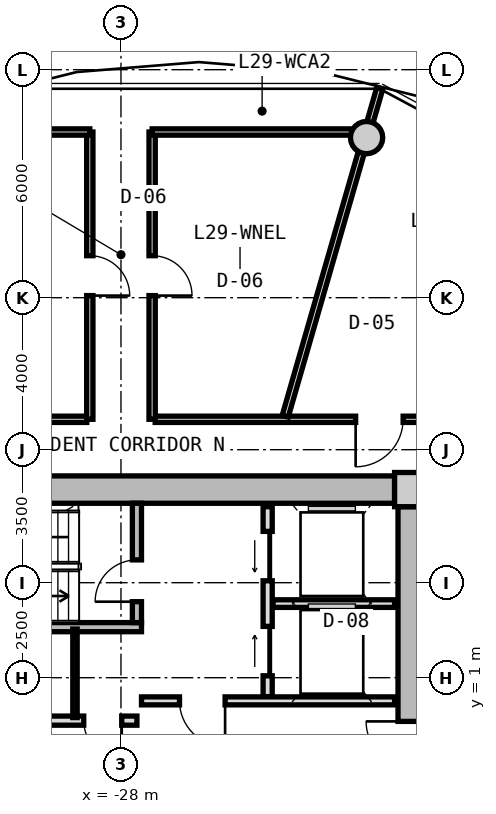
"""IFC4 building model, lengths in metres.
Left out: names, types, materials, properties, quantities, classifications, styles, units other than length and angle.
Written with IfcOpenShell. Run it as: python <this file> out.ifc"""

import sys

from ifc_helpers import new_model, si_unit, direction, frame, frame_2d, origin, origin_2d, place, context, subcontext, project, spatial, rectangle, circle, extrude, source, transform, mapped, element, fill, save


model = new_model("IFC4")
c1 = context("Model", 3, precision=1e-05, world=origin(), true_north=direction((0.0, 1.0)))
c2 = subcontext(c1, "Body", "Model", "MODEL_VIEW")
j1 = project(units=[si_unit("LENGTHUNIT", "METRE"), si_unit("PLANEANGLEUNIT", "RADIAN")], contexts=[c1])
p1 = place(None, origin())
s1 = spatial("IfcSite", under=j1, at=p1, CompositionType="ELEMENT")
p2 = place(p1, origin())
s2 = spatial("IfcBuilding", under=s1, at=p2, CompositionType="ELEMENT")
p3 = place(p2, frame((0.0, 0.0, 96.25)))
s3 = spatial("IfcBuildingStorey", under=s2, at=p3, CompositionType="ELEMENT", Elevation=96.25)
m1 = source(origin(), c2, "Body", "SweptSolid", [
    extrude(rectangle(XDim=0.9, YDim=0.9, at=origin_2d()), origin(), (0.0, 0.0, 1.0), 3.05),
])
p4 = place(p3, frame((-20.35, 5.95, 0.0), z_axis=(0.0, 0.0, 1.0), x_axis=(1.0, 0.0, 0.0)))
e1 = element("IfcColumn", 1, at=p4, inside=s3, PredefinedType="COLUMN", context=c2, shape_type="MappedRepresentation", body=[
    mapped(m1, transform((0.0, 0.0, 0.0), x_axis=(1.0, 0.0, 0.0), y_axis=(0.0, 1.0, 0.0), z_axis=(0.0, 0.0, 1.0), scale=1.0)),
])
m2 = source(origin(), c2, "Body", "SweptSolid", [
    extrude(rectangle(XDim=14.4, YDim=0.72, at=frame_2d((7.2, 0.0))), origin(), (0.0, 0.0, 1.0), 2.79),
])
p5 = place(p3, frame((-35.2, 5.95, 0.0), z_axis=(0.0, 0.0, 1.0), x_axis=(1.0, 0.0, 0.0)))
e2 = element("IfcWall", 2, at=p5, inside=s3, PredefinedType="SHEAR", context=c2, shape_type="MappedRepresentation", body=[
    mapped(m2, transform((0.0, 0.0, 0.0), x_axis=(1.0, 0.0, 0.0), y_axis=(0.0, 1.0, 0.0), z_axis=(0.0, 0.0, 1.0), scale=1.0)),
])
m3 = source(origin(), c2, "Body", "SweptSolid", [
    extrude(rectangle(XDim=11.0, YDim=0.72, at=frame_2d((5.5, 0.0))), origin(), (0.0, 0.0, 1.0), 2.79),
])
p6 = place(p3, frame((-20.35, 5.5, 0.0), z_axis=(0.0, 0.0, 1.0), x_axis=(0.0, -1.0, 0.0)))
e3 = element("IfcWall", 3, at=p6, inside=s3, PredefinedType="SHEAR", context=c2, shape_type="MappedRepresentation", body=[
    mapped(m3, transform((0.0, 0.0, 0.0), x_axis=(1.0, 0.0, 0.0), y_axis=(0.0, 1.0, 0.0), z_axis=(0.0, 0.0, 1.0), scale=1.0)),
])
p7 = place(p6, frame((5.65, 0.0, 0.0)))
e4 = element("IfcOpeningElement", 4, at=p7, cuts=e3, PredefinedType="OPENING", context=c2, shape_type="SweptSolid", body=[
    extrude(rectangle(XDim=1.2, YDim=2.15, at=frame_2d((0.6, 1.075))), frame((0.0, 0.37, 0.0), z_axis=(0.0, -1.0, 0.0), x_axis=(1.0, 0.0, 0.0)), (0.0, 0.0, 1.0), 0.74),
])
p8 = place(p6, frame((9.3, 0.0, 0.0)))
e5 = element("IfcOpeningElement", 5, at=p8, cuts=e3, PredefinedType="OPENING", context=c2, shape_type="SweptSolid", body=[
    extrude(rectangle(XDim=1.0, YDim=2.1, at=frame_2d((0.5, 1.05))), frame((0.0, 0.37, 0.0), z_axis=(0.0, -1.0, 0.0), x_axis=(1.0, 0.0, 0.0)), (0.0, 0.0, 1.0), 0.74),
])
m4 = source(origin(), c2, "Body", "SweptSolid", [
    extrude(circle(Radius=0.425, at=origin_2d()), origin(), (0.0, 0.0, 1.0), 3.05),
])
p9 = place(p3, frame((-21.537, 15.213, 0.0), z_axis=(0.0, 0.0, 1.0), x_axis=(1.0, 0.0, 0.0)))
e6 = element("IfcColumn", 6, at=p9, inside=s3, PredefinedType="COLUMN", context=c2, shape_type="MappedRepresentation", body=[
    mapped(m4, transform((0.0, 0.0, 0.0), x_axis=(1.0, 0.0, 0.0), y_axis=(0.0, 1.0, 0.0), z_axis=(0.0, 0.0, 1.0), scale=1.0)),
])
m5 = source(origin(), c2, "Body", "SweptSolid", [
    extrude(rectangle(XDim=7.83, YDim=0.24, at=frame_2d((3.915, 0.0))), origin(), (0.0, 0.0, 1.0), 2.79),
])
p10 = place(p3, frame((-35.29, 2.33, 0.0), z_axis=(0.0, 0.0, 1.0), x_axis=(1.0, 0.0, 0.0)))
e7 = element("IfcWall", 7, at=p10, inside=s3, PredefinedType="PARTITIONING", context=c2, shape_type="MappedRepresentation", body=[
    mapped(m5, transform((0.0, 0.0, 0.0), x_axis=(1.0, 0.0, 0.0), y_axis=(0.0, 1.0, 0.0), z_axis=(0.0, 0.0, 1.0), scale=1.0)),
])
m6 = source(origin(), c2, "Body", "SweptSolid", [
    extrude(rectangle(XDim=3.14, YDim=0.24, at=frame_2d((1.57, 0.0))), origin(), (0.0, 0.0, 1.0), 2.79),
])
p11 = place(p3, frame((-27.58, 2.45, 0.0), z_axis=(0.0, 0.0, 1.0), x_axis=(0.0, 1.0, 0.0)))
e8 = element("IfcWall", 8, at=p11, inside=s3, PredefinedType="PARTITIONING", context=c2, shape_type="MappedRepresentation", body=[
    mapped(m6, transform((0.0, 0.0, 0.0), x_axis=(1.0, 0.0, 0.0), y_axis=(0.0, 1.0, 0.0), z_axis=(0.0, 0.0, 1.0), scale=1.0)),
])
p12 = place(p11, frame((0.55, 0.0, 0.0)))
e9 = element("IfcOpeningElement", 9, at=p12, cuts=e8, PredefinedType="OPENING", context=c2, shape_type="SweptSolid", body=[
    extrude(rectangle(XDim=1.1, YDim=2.15, at=frame_2d((0.55, 1.075))), frame((0.0, 0.13, 0.0), z_axis=(0.0, -1.0, 0.0), x_axis=(1.0, 0.0, 0.0)), (0.0, 0.0, 1.0), 0.26),
])
m7 = source(origin(), c2, "Body", "SweptSolid", [
    extrude(rectangle(XDim=5.0, YDim=0.24, at=frame_2d((2.5, 0.0))), origin(), (0.0, 0.0, 1.0), 2.775),
])
p13 = place(p3, frame((-24.14, 0.5, 0.0), z_axis=(0.0, 0.0, 1.0), x_axis=(0.0, 1.0, 0.0)))
e10 = element("IfcWall", 10, at=p13, inside=s3, PredefinedType="PARTITIONING", context=c2, shape_type="MappedRepresentation", body=[
    mapped(m7, transform((0.0, 0.0, 0.0), x_axis=(1.0, 0.0, 0.0), y_axis=(0.0, 1.0, 0.0), z_axis=(0.0, 0.0, 1.0), scale=1.0)),
])
p14 = place(p13, frame((3.05, 0.0, 0.0)))
e11 = element("IfcOpeningElement", 11, at=p14, cuts=e10, PredefinedType="OPENING", context=c2, shape_type="SweptSolid", body=[
    extrude(rectangle(XDim=1.3, YDim=2.2, at=frame_2d((0.65, 1.1))), frame((0.0, 0.13, 0.0), z_axis=(0.0, -1.0, 0.0), x_axis=(1.0, 0.0, 0.0)), (0.0, 0.0, 1.0), 0.26),
])
p15 = place(p13, frame((0.55, 0.0, 0.0)))
e12 = element("IfcOpeningElement", 12, at=p15, cuts=e10, PredefinedType="OPENING", context=c2, shape_type="SweptSolid", body=[
    extrude(rectangle(XDim=1.3, YDim=2.2, at=frame_2d((0.65, 1.1))), frame((0.0, 0.13, 0.0), z_axis=(0.0, -1.0, 0.0), x_axis=(1.0, 0.0, 0.0)), (0.0, 0.0, 1.0), 0.26),
])
m8 = source(origin(), c2, "Body", "SweptSolid", [
    extrude(rectangle(XDim=3.2, YDim=0.2, at=frame_2d((1.6, 0.0))), origin(), (0.0, 0.0, 1.0), 2.775),
])
p16 = place(p3, frame((-24.0, 2.95, 0.0), z_axis=(0.0, 0.0, 1.0), x_axis=(1.0, 0.0, 0.0)))
e13 = element("IfcWall", 13, at=p16, inside=s3, PredefinedType="PARTITIONING", context=c2, shape_type="MappedRepresentation", body=[
    mapped(m8, transform((0.0, 0.0, 0.0), x_axis=(1.0, 0.0, 0.0), y_axis=(0.0, 1.0, 0.0), z_axis=(0.0, 0.0, 1.0), scale=1.0)),
])
m9 = source(origin(), c2, "Body", "SweptSolid", [
    extrude(rectangle(XDim=6.66, YDim=0.21, at=frame_2d((3.33, 0.0))), origin(), (0.0, 0.0, 1.0), 2.775),
])
p17 = place(p3, frame((-27.46, 0.39, 0.0), z_axis=(0.0, 0.0, 1.0), x_axis=(1.0, 0.0, 0.0)))
e14 = element("IfcWall", 14, at=p17, inside=s3, PredefinedType="PARTITIONING", context=c2, shape_type="MappedRepresentation", body=[
    mapped(m9, transform((0.0, 0.0, 0.0), x_axis=(1.0, 0.0, 0.0), y_axis=(0.0, 1.0, 0.0), z_axis=(0.0, 0.0, 1.0), scale=1.0)),
])
p18 = place(p17, frame((1.0, 0.0, 0.0)))
e15 = element("IfcOpeningElement", 15, at=p18, cuts=e14, PredefinedType="OPENING", context=c2, shape_type="SweptSolid", body=[
    extrude(rectangle(XDim=1.2, YDim=2.15, at=frame_2d((0.6, 1.075))), frame((0.0, 0.115, 0.0), z_axis=(0.0, -1.0, 0.0), x_axis=(1.0, 0.0, 0.0)), (0.0, 0.0, 1.0), 0.23),
])
m10 = source(origin(), c2, "Body", "SweptSolid", [
    extrude(rectangle(XDim=7.62, YDim=0.24, at=frame_2d((3.81, 0.0))), origin(), (0.0, 0.0, 1.0), 2.775),
])
p19 = place(p3, frame((-35.2, -0.13, 0.0), z_axis=(0.0, 0.0, 1.0), x_axis=(1.0, 0.0, 0.0)))
e16 = element("IfcWall", 16, at=p19, inside=s3, PredefinedType="PARTITIONING", context=c2, shape_type="MappedRepresentation", body=[
    mapped(m10, transform((0.0, 0.0, 0.0), x_axis=(1.0, 0.0, 0.0), y_axis=(0.0, 1.0, 0.0), z_axis=(0.0, 0.0, 1.0), scale=1.0)),
])
p20 = place(p19, frame((6.22, 0.0, 0.0)))
e17 = element("IfcOpeningElement", 17, at=p20, cuts=e16, PredefinedType="OPENING", context=c2, shape_type="SweptSolid", body=[
    extrude(rectangle(XDim=1.0, YDim=2.1, at=frame_2d((0.5, 1.05))), frame((0.0, 0.13, 0.0), z_axis=(0.0, -1.0, 0.0), x_axis=(1.0, 0.0, 0.0)), (0.0, 0.0, 1.0), 0.26),
])
p21 = place(p19, frame((2.4, 0.0, 0.0)))
e18 = element("IfcOpeningElement", 18, at=p21, cuts=e16, PredefinedType="OPENING", context=c2, shape_type="SweptSolid", body=[
    extrude(rectangle(XDim=1.0, YDim=2.1, at=frame_2d((0.5, 1.05))), frame((0.0, 0.13, 0.0), z_axis=(0.0, -1.0, 0.0), x_axis=(1.0, 0.0, 0.0)), (0.0, 0.0, 1.0), 0.26),
])
m11 = source(origin(), c2, "Body", "SweptSolid", [
    extrude(rectangle(XDim=2.33, YDim=0.115, at=frame_2d((1.165, 0.0))), origin(), (0.0, 0.0, 1.0), 2.775),
])
p22 = place(p3, frame((-29.21, -0.05, 0.0), z_axis=(0.0, 0.0, 1.0), x_axis=(0.0, 1.0, 0.0)))
e19 = element("IfcWall", 19, at=p22, inside=s3, PredefinedType="PARTITIONING", context=c2, shape_type="MappedRepresentation", body=[
    mapped(m11, transform((0.0, 0.0, 0.0), x_axis=(1.0, 0.0, 0.0), y_axis=(0.0, 1.0, 0.0), z_axis=(0.0, 0.0, 1.0), scale=1.0)),
])
m12 = source(origin(), c2, "Body", "SweptSolid", [
    extrude(rectangle(XDim=8.6, YDim=0.165, at=frame_2d((4.3, 0.0))), origin(), (0.0, 0.0, 1.0), 2.775),
])
p23 = place(p3, frame((-37.5, 7.8, 0.0), z_axis=(0.0, 0.0, 1.0), x_axis=(1.0, 0.0, 0.0)))
e20 = element("IfcWall", 20, at=p23, inside=s3, PredefinedType="PARTITIONING", context=c2, shape_type="MappedRepresentation", body=[
    mapped(m12, transform((0.0, 0.0, 0.0), x_axis=(1.0, 0.0, 0.0), y_axis=(0.0, 1.0, 0.0), z_axis=(0.0, 0.0, 1.0), scale=1.0)),
])
p24 = place(p3, frame((-27.1, 7.8, 0.0), z_axis=(0.0, 0.0, 1.0), x_axis=(1.0, 0.0, 0.0)))
e21 = element("IfcWall", 21, at=p24, inside=s3, PredefinedType="PARTITIONING", context=c2, shape_type="MappedRepresentation", body=[
    mapped(m12, transform((0.0, 0.0, 0.0), x_axis=(1.0, 0.0, 0.0), y_axis=(0.0, 1.0, 0.0), z_axis=(0.0, 0.0, 1.0), scale=1.0)),
])
p25 = place(p24, frame((5.275, 0.0, 0.0)))
e22 = element("IfcOpeningElement", 22, at=p25, cuts=e21, PredefinedType="OPENING", context=c2, shape_type="SweptSolid", body=[
    extrude(rectangle(XDim=1.25, YDim=2.2, at=frame_2d((0.625, 1.1))), frame((0.0, 0.093, 0.0), z_axis=(0.0, -1.0, 0.0), x_axis=(1.0, 0.0, 0.0)), (0.0, 0.0, 1.0), 0.185),
])
m13 = source(origin(), c2, "Body", "SweptSolid", [
    extrude(rectangle(XDim=8.989, YDim=0.165, at=frame_2d((4.495, 0.0))), origin(), (0.0, 0.0, 1.0), 2.275),
])
p26 = place(p3, frame((-23.678, 7.88, 0.0), z_axis=(0.0, 0.0, 1.0), x_axis=(0.27702323008, 0.960863221274, 0.0)))
e23 = element("IfcWall", 23, at=p26, inside=s3, PredefinedType="PARTITIONING", context=c2, shape_type="MappedRepresentation", body=[
    mapped(m13, transform((0.0, 0.0, 0.0), x_axis=(1.0, 0.0, 0.0), y_axis=(0.0, 1.0, 0.0), z_axis=(0.0, 0.0, 1.0), scale=1.0)),
])
m14 = source(origin(), c2, "Body", "SweptSolid", [
    extrude(rectangle(XDim=7.56, YDim=0.165, at=frame_2d((3.78, 0.0))), origin(), (0.0, 0.0, 1.0), 2.775),
])
p27 = place(p3, frame((-28.82, 7.8, 0.0), z_axis=(0.0, 0.0, 1.0), x_axis=(0.0, 1.0, 0.0)))
e24 = element("IfcWall", 24, at=p27, inside=s3, PredefinedType="PARTITIONING", context=c2, shape_type="MappedRepresentation", body=[
    mapped(m14, transform((0.0, 0.0, 0.0), x_axis=(1.0, 0.0, 0.0), y_axis=(0.0, 1.0, 0.0), z_axis=(0.0, 0.0, 1.0), scale=1.0)),
])
p28 = place(p27, frame((3.255, 0.0, 0.0)))
e25 = element("IfcOpeningElement", 25, at=p28, cuts=e24, PredefinedType="OPENING", context=c2, shape_type="SweptSolid", body=[
    extrude(rectangle(XDim=1.05, YDim=2.15, at=frame_2d((0.525, 1.075))), frame((0.0, 0.093, 0.0), z_axis=(0.0, -1.0, 0.0), x_axis=(1.0, 0.0, 0.0)), (0.0, 0.0, 1.0), 0.185),
])
m15 = source(origin(), c2, "Body", "SweptSolid", [
    extrude(rectangle(XDim=4.307, YDim=0.165, at=frame_2d((2.153, 0.0))), origin(), (0.0, 0.0, 1.0), 2.275),
])
p29 = place(p3, frame((-33.127, 15.36, 0.0), z_axis=(0.0, 0.0, 1.0), x_axis=(1.0, 0.0, 0.0)))
e26 = element("IfcWall", 26, at=p29, inside=s3, PredefinedType="PARTITIONING", context=c2, shape_type="MappedRepresentation", body=[
    mapped(m15, transform((0.0, 0.0, 0.0), x_axis=(1.0, 0.0, 0.0), y_axis=(0.0, 1.0, 0.0), z_axis=(0.0, 0.0, 1.0), scale=1.0)),
])
p30 = place(p3, frame((-27.18, 7.8, 0.0), z_axis=(0.0, 0.0, 1.0), x_axis=(0.0, 1.0, 0.0)))
e27 = element("IfcWall", 27, at=p30, inside=s3, PredefinedType="PARTITIONING", context=c2, shape_type="MappedRepresentation", body=[
    mapped(m14, transform((0.0, 0.0, 0.0), x_axis=(1.0, 0.0, 0.0), y_axis=(0.0, 1.0, 0.0), z_axis=(0.0, 0.0, 1.0), scale=1.0)),
])
p31 = place(p30, frame((3.255, 0.0, 0.0)))
e28 = element("IfcOpeningElement", 28, at=p31, cuts=e27, PredefinedType="OPENING", context=c2, shape_type="SweptSolid", body=[
    extrude(rectangle(XDim=1.05, YDim=2.15, at=frame_2d((0.525, 1.075))), frame((0.0, 0.093, 0.0), z_axis=(0.0, -1.0, 0.0), x_axis=(1.0, 0.0, 0.0)), (0.0, 0.0, 1.0), 0.185),
])
m16 = source(origin(), c2, "Body", "SweptSolid", [
    extrude(rectangle(XDim=5.814, YDim=0.165, at=frame_2d((2.907, 0.0))), origin(), (0.0, 0.0, 1.0), 2.275),
])
p32 = place(p3, frame((-27.18, 15.36, 0.0), z_axis=(0.0, 0.0, 1.0), x_axis=(1.0, 0.0, 0.0)))
e29 = element("IfcWall", 29, at=p32, inside=s3, PredefinedType="PARTITIONING", context=c2, shape_type="MappedRepresentation", body=[
    mapped(m16, transform((0.0, 0.0, 0.0), x_axis=(1.0, 0.0, 0.0), y_axis=(0.0, 1.0, 0.0), z_axis=(0.0, 0.0, 1.0), scale=1.0)),
])
m17 = source(origin(), c2, "Body", "SweptSolid", [
    extrude(rectangle(XDim=1.1, YDim=2.15, at=frame_2d((0.55, 1.075))), frame((0.0, 0.025, 0.0), z_axis=(0.0, -1.0, 0.0), x_axis=(1.0, 0.0, 0.0)), (0.0, 0.0, 1.0), 0.05),
])
p33 = place(p12, origin())
e30 = element("IfcDoor", 30, at=p33, inside=s3, OperationType="SINGLE_SWING_LEFT", PredefinedType="DOOR", context=c2, shape_type="MappedRepresentation", body=[
    mapped(m17, transform((0.0, 0.0, 0.0), x_axis=(1.0, 0.0, 0.0), y_axis=(0.0, 1.0, 0.0), z_axis=(0.0, 0.0, 1.0), scale=1.0)),
])
fill(e9, e30)
m18 = source(origin(), c2, "Body", "SweptSolid", [
    extrude(rectangle(XDim=1.3, YDim=2.2, at=frame_2d((0.65, 1.1))), frame((0.0, 0.025, 0.0), z_axis=(0.0, -1.0, 0.0), x_axis=(1.0, 0.0, 0.0)), (0.0, 0.0, 1.0), 0.05),
])
p34 = place(p14, origin())
e31 = element("IfcDoor", 31, at=p34, inside=s3, OperationType="SLIDING_TO_LEFT", PredefinedType="DOOR", context=c2, shape_type="MappedRepresentation", body=[
    mapped(m18, transform((0.0, 0.0, 0.0), x_axis=(1.0, 0.0, 0.0), y_axis=(0.0, 1.0, 0.0), z_axis=(0.0, 0.0, 1.0), scale=1.0)),
])
fill(e11, e31)
p35 = place(p15, origin())
e32 = element("IfcDoor", 32, at=p35, inside=s3, OperationType="SLIDING_TO_RIGHT", PredefinedType="DOOR", context=c2, shape_type="MappedRepresentation", body=[
    mapped(m18, transform((0.0, 0.0, 0.0), x_axis=(1.0, 0.0, 0.0), y_axis=(0.0, 1.0, 0.0), z_axis=(0.0, 0.0, 1.0), scale=1.0)),
])
fill(e12, e32)
m19 = source(origin(), c2, "Body", "SweptSolid", [
    extrude(rectangle(XDim=1.2, YDim=2.15, at=frame_2d((0.6, 1.075))), frame((0.0, 0.025, 0.0), z_axis=(0.0, -1.0, 0.0), x_axis=(1.0, 0.0, 0.0)), (0.0, 0.0, 1.0), 0.05),
])
p36 = place(p18, frame((1.2, 0.0, 0.0), z_axis=(0.0, 0.0, 1.0), x_axis=(-1.0, 0.0, 0.0)))
e33 = element("IfcDoor", 33, at=p36, inside=s3, OperationType="SINGLE_SWING_LEFT", PredefinedType="DOOR", context=c2, shape_type="MappedRepresentation", body=[
    mapped(m19, transform((0.0, 0.0, 0.0), x_axis=(1.0, 0.0, 0.0), y_axis=(0.0, 1.0, 0.0), z_axis=(0.0, 0.0, 1.0), scale=1.0)),
])
fill(e15, e33)
p37 = place(p7, frame((1.2, 0.0, 0.0), z_axis=(0.0, 0.0, 1.0), x_axis=(-1.0, 0.0, 0.0)))
e34 = element("IfcDoor", 34, at=p37, inside=s3, OperationType="SINGLE_SWING_RIGHT", PredefinedType="DOOR", context=c2, shape_type="MappedRepresentation", body=[
    mapped(m19, transform((0.0, 0.0, 0.0), x_axis=(1.0, 0.0, 0.0), y_axis=(0.0, 1.0, 0.0), z_axis=(0.0, 0.0, 1.0), scale=1.0)),
])
fill(e4, e34)
m20 = source(origin(), c2, "Body", "SweptSolid", [
    extrude(rectangle(XDim=1.0, YDim=2.1, at=frame_2d((0.5, 1.05))), frame((0.0, 0.025, 0.0), z_axis=(0.0, -1.0, 0.0), x_axis=(1.0, 0.0, 0.0)), (0.0, 0.0, 1.0), 0.05),
])
p38 = place(p20, frame((1.0, 0.0, 0.0), z_axis=(0.0, 0.0, 1.0), x_axis=(-1.0, 0.0, 0.0)))
e35 = element("IfcDoor", 35, at=p38, inside=s3, OperationType="SINGLE_SWING_LEFT", PredefinedType="DOOR", context=c2, shape_type="MappedRepresentation", body=[
    mapped(m20, transform((0.0, 0.0, 0.0), x_axis=(1.0, 0.0, 0.0), y_axis=(0.0, 1.0, 0.0), z_axis=(0.0, 0.0, 1.0), scale=1.0)),
])
fill(e17, e35)
m21 = source(origin(), c2, "Body", "SweptSolid", [
    extrude(rectangle(XDim=1.05, YDim=2.15, at=frame_2d((0.525, 1.075))), frame((0.0, 0.025, 0.0), z_axis=(0.0, -1.0, 0.0), x_axis=(1.0, 0.0, 0.0)), (0.0, 0.0, 1.0), 0.05),
])
p39 = place(p28, frame((1.05, 0.0, 0.0), z_axis=(0.0, 0.0, 1.0), x_axis=(-1.0, 0.0, 0.0)))
e36 = element("IfcDoor", 36, at=p39, inside=s3, OperationType="SINGLE_SWING_RIGHT", PredefinedType="DOOR", context=c2, shape_type="MappedRepresentation", body=[
    mapped(m21, transform((0.0, 0.0, 0.0), x_axis=(1.0, 0.0, 0.0), y_axis=(0.0, 1.0, 0.0), z_axis=(0.0, 0.0, 1.0), scale=1.0)),
])
fill(e25, e36)
p40 = place(p31, frame((1.05, 0.0, 0.0), z_axis=(0.0, 0.0, 1.0), x_axis=(-1.0, 0.0, 0.0)))
e37 = element("IfcDoor", 37, at=p40, inside=s3, OperationType="SINGLE_SWING_RIGHT", PredefinedType="DOOR", context=c2, shape_type="MappedRepresentation", body=[
    mapped(m21, transform((0.0, 0.0, 0.0), x_axis=(1.0, 0.0, 0.0), y_axis=(0.0, 1.0, 0.0), z_axis=(0.0, 0.0, 1.0), scale=1.0)),
])
fill(e28, e37)
m22 = source(origin(), c2, "Body", "SweptSolid", [
    extrude(rectangle(XDim=1.25, YDim=2.2, at=frame_2d((0.625, 1.1))), frame((0.0, 0.025, 0.0), z_axis=(0.0, -1.0, 0.0), x_axis=(1.0, 0.0, 0.0)), (0.0, 0.0, 1.0), 0.05),
])
p41 = place(p25, frame((1.25, 0.0, 0.0), z_axis=(0.0, 0.0, 1.0), x_axis=(-1.0, 0.0, 0.0)))
e38 = element("IfcDoor", 38, at=p41, inside=s3, OperationType="SINGLE_SWING_RIGHT", PredefinedType="DOOR", context=c2, shape_type="MappedRepresentation", body=[
    mapped(m22, transform((0.0, 0.0, 0.0), x_axis=(1.0, 0.0, 0.0), y_axis=(0.0, 1.0, 0.0), z_axis=(0.0, 0.0, 1.0), scale=1.0)),
])
fill(e22, e38)
save(model, sys.argv[1])
